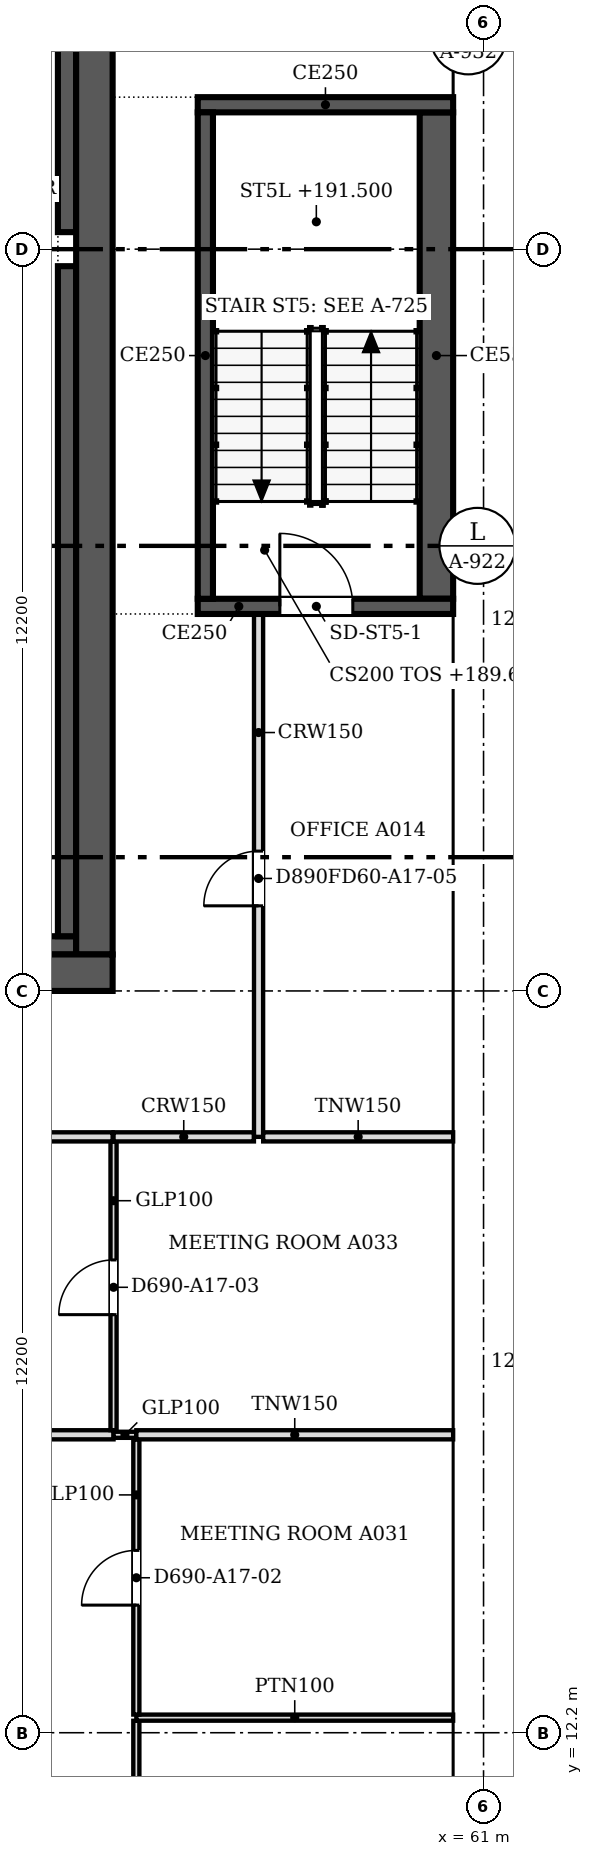
"""IFC4 building model, lengths in metres.
Left out: names, types, materials, properties, quantities, classifications, styles, units other than length and angle.
Written with IfcOpenShell. Run it as: python <this file> out.ifc"""

import sys

from ifc_helpers import new_model, si_unit, direction, frame, frame_2d, origin, place, context, subcontext, project, spatial, polyline, rectangle, outline, extrude, faceted_brep, source, transform, mapped, element, fill, save


model = new_model("IFC4")
c1 = context("Model", 3, precision=1e-05, world=origin(), true_north=direction((0.0, 1.0)))
c2 = subcontext(c1, "Body", "Model", "MODEL_VIEW")
j1 = project(units=[si_unit("LENGTHUNIT", "METRE"), si_unit("PLANEANGLEUNIT", "RADIAN")], contexts=[c1])
p1 = place(None, origin())
s1 = spatial("IfcSite", under=j1, at=p1, CompositionType="ELEMENT")
p2 = place(p1, origin())
s2 = spatial("IfcBuilding", under=s1, at=p2, CompositionType="ELEMENT")
p3 = place(p2, frame((0.0, 0.0, 189.6)))
s3 = spatial("IfcBuildingStorey", under=s2, at=p3, CompositionType="ELEMENT", Elevation=189.6)
m1 = source(origin(), c2, "Body", "SweptSolid", [
    extrude(outline(polyline([(3.05, 0.0), (6.1, 3.8), (3.05, 7.6), (0.0, 3.8), (3.05, 0.0)])), frame((0.0, 0.25, 0.0), z_axis=(0.0, -1.0, 0.0), x_axis=(1.0, 0.0, 0.0)), (0.0, 0.0, 1.0), 0.5),
])
p4 = place(p3, frame((60.75, 9.15, -3.8), z_axis=(0.0, 0.0, 1.0), x_axis=(0.0, 1.0, 0.0)))
e1 = element("IfcWall", 1, at=p4, inside=s3, PredefinedType="SOLIDWALL", context=c2, shape_type="MappedRepresentation", body=[
    mapped(m1, transform((0.0, 0.0, 0.0), scale=1.0)),
])
m2 = source(origin(), c2, "Body", "SweptSolid", [
    extrude(outline(polyline([(3.05, 0.399), (5.78, 3.8), (3.05, 7.2), (0.321, 3.8), (3.05, 0.399)])), frame((0.0, 0.26, 0.0), z_axis=(0.0, -1.0, 0.0), x_axis=(1.0, 0.0, 0.0)), (0.0, 0.0, 1.0), 0.52),
])
p5 = place(p4, origin())
e2 = element("IfcOpeningElement", 2, at=p5, cuts=e1, PredefinedType="OPENING", context=c2, shape_type="MappedRepresentation", body=[
    mapped(m2, transform((0.0, 0.0, 0.0), scale=1.0)),
])
p6 = place(p3, frame((60.75, 15.25, -3.8), z_axis=(0.0, 0.0, 1.0), x_axis=(0.0, 1.0, 0.0)))
e3 = element("IfcWall", 3, at=p6, inside=s3, PredefinedType="SOLIDWALL", context=c2, shape_type="MappedRepresentation", body=[
    mapped(m1, transform((0.0, 0.0, 0.0), scale=1.0)),
])
p7 = place(p6, origin())
e4 = element("IfcOpeningElement", 4, at=p7, cuts=e3, PredefinedType="OPENING", context=c2, shape_type="MappedRepresentation", body=[
    mapped(m2, transform((0.0, 0.0, 0.0), scale=1.0)),
])
m3 = source(origin(), c2, "Body", "Brep", [
    faceted_brep([(3.05, -0.25, 0.0), (6.1, -0.25, 3.8), (6.1, -0.25, 3.8), (3.05, -0.25, 7.6), (0.0, -0.25, 3.8), (0.0, 0.25, 3.8), (3.05, 0.25, 7.6), (6.1, 0.25, 3.8), (6.1, 0.25, 3.8), (3.05, 0.25, 0.0)], [[[0, 1, 2, 3, 4]], [[5, 6, 7, 8, 9]], [[9, 8, 1, 0]], [[7, 6, 3, 2]], [[6, 5, 4, 3]], [[5, 9, 0, 4]], [[1, 8, 7, 2]]]),
])
p8 = place(p3, frame((60.75, 21.35, -3.8), z_axis=(0.0, 0.0, 1.0), x_axis=(0.0, 1.0, 0.0)))
e5 = element("IfcWall", 5, at=p8, inside=s3, PredefinedType="SOLIDWALL", context=c2, shape_type="MappedRepresentation", body=[
    mapped(m3, transform((0.0, 0.0, 0.0), scale=1.0)),
])
p9 = place(p8, origin())
e6 = element("IfcOpeningElement", 6, at=p9, cuts=e5, PredefinedType="OPENING", context=c2, shape_type="MappedRepresentation", body=[
    mapped(m2, transform((0.0, 0.0, 0.0), scale=1.0)),
])
p10 = place(p3, frame((60.75, 27.45, -3.8), z_axis=(0.0, 0.0, 1.0), x_axis=(0.0, 1.0, 0.0)))
e7 = element("IfcWall", 7, at=p10, inside=s3, PredefinedType="SOLIDWALL", context=c2, shape_type="MappedRepresentation", body=[
    mapped(m1, transform((0.0, 0.0, 0.0), scale=1.0)),
])
p11 = place(p10, origin())
e8 = element("IfcOpeningElement", 8, at=p11, cuts=e7, PredefinedType="OPENING", context=c2, shape_type="MappedRepresentation", body=[
    mapped(m2, transform((0.0, 0.0, 0.0), scale=1.0)),
])
p12 = place(p3, frame((60.75, 33.55, -3.8), z_axis=(0.0, 0.0, 1.0), x_axis=(0.0, 1.0, 0.0)))
e9 = element("IfcWall", 9, at=p12, inside=s3, PredefinedType="SOLIDWALL", context=c2, shape_type="MappedRepresentation", body=[
    mapped(m3, transform((0.0, 0.0, 0.0), scale=1.0)),
])
p13 = place(p12, origin())
e10 = element("IfcOpeningElement", 10, at=p13, cuts=e9, PredefinedType="OPENING", context=c2, shape_type="MappedRepresentation", body=[
    mapped(m2, transform((0.0, 0.0, 0.0), scale=1.0)),
])
p14 = place(p3, frame((60.75, 39.65, -3.8), z_axis=(0.0, 0.0, 1.0), x_axis=(0.0, 1.0, 0.0)))
e11 = element("IfcWall", 11, at=p14, inside=s3, PredefinedType="SOLIDWALL", context=c2, shape_type="MappedRepresentation", body=[
    mapped(m1, transform((0.0, 0.0, 0.0), scale=1.0)),
])
p15 = place(p14, origin())
e12 = element("IfcOpeningElement", 12, at=p15, cuts=e11, PredefinedType="OPENING", context=c2, shape_type="MappedRepresentation", body=[
    mapped(m2, transform((0.0, 0.0, 0.0), scale=1.0)),
])
m4 = source(origin(), c2, "Body", "Brep", [
    faceted_brep([(3.003, -0.25, 0.0), (6.053, -0.25, 3.8), (0.0, -0.25, 3.8), (0.047, 0.25, 3.8), (6.053, 0.25, 3.8), (3.003, 0.25, 0.0), (0.047, 0.25, 3.741), (0.0, 0.0, 3.8)], [[[0, 1, 2]], [[3, 4, 5, 6]], [[5, 4, 1, 0]], [[4, 3, 7, 2, 1]], [[6, 5, 0, 2, 7]], [[6, 7, 3]]]),
])
p16 = place(p3, frame((60.75, 6.146, 0.0), z_axis=(0.0, 0.0, 1.0), x_axis=(0.0, 1.0, 0.0)))
e13 = element("IfcWall", 13, at=p16, inside=s3, PredefinedType="SOLIDWALL", context=c2, shape_type="MappedRepresentation", body=[
    mapped(m4, transform((0.0, 0.0, 0.0), scale=1.0)),
])
m5 = source(origin(), c2, "Body", "SweptSolid", [
    extrude(outline(polyline([(3.005, 0.401), (5.532, 3.55), (0.516, 3.55), (3.005, 0.401)])), frame((0.0, 0.26, 0.0), z_axis=(0.0, -1.0, 0.0), x_axis=(1.0, 0.0, 0.0)), (0.0, 0.0, 1.0), 0.52),
])
p17 = place(p16, origin())
e14 = element("IfcOpeningElement", 14, at=p17, cuts=e13, PredefinedType="OPENING", context=c2, shape_type="MappedRepresentation", body=[
    mapped(m5, transform((0.0, 0.0, 0.0), scale=1.0)),
])
m6 = source(origin(), c2, "Body", "SweptSolid", [
    extrude(outline(polyline([(3.05, 0.0), (6.1, 3.8), (0.0, 3.8), (3.05, 0.0)])), frame((0.0, 0.25, 0.0), z_axis=(0.0, -1.0, 0.0), x_axis=(1.0, 0.0, 0.0)), (0.0, 0.0, 1.0), 0.5),
])
p18 = place(p3, frame((60.75, 12.2, 0.0), z_axis=(0.0, 0.0, 1.0), x_axis=(0.0, 1.0, 0.0)))
e15 = element("IfcWall", 15, at=p18, inside=s3, PredefinedType="SOLIDWALL", context=c2, shape_type="MappedRepresentation", body=[
    mapped(m6, transform((0.0, 0.0, 0.0), scale=1.0)),
])
m7 = source(origin(), c2, "Body", "SweptSolid", [
    extrude(outline(polyline([(3.05, 0.399), (5.579, 3.55), (0.521, 3.55), (3.05, 0.399)])), frame((0.0, 0.26, 0.0), z_axis=(0.0, -1.0, 0.0), x_axis=(1.0, 0.0, 0.0)), (0.0, 0.0, 1.0), 0.52),
])
p19 = place(p18, origin())
e16 = element("IfcOpeningElement", 16, at=p19, cuts=e15, PredefinedType="OPENING", context=c2, shape_type="MappedRepresentation", body=[
    mapped(m7, transform((0.0, 0.0, 0.0), scale=1.0)),
])
m8 = source(origin(), c2, "Body", "Brep", [
    faceted_brep([(3.05, -0.25, 0.0), (6.1, -0.25, 3.8), (6.1, -0.25, 3.8), (0.0, -0.25, 3.8), (0.0, 0.25, 3.8), (6.1, 0.25, 3.8), (6.1, 0.25, 3.8), (3.05, 0.25, 0.0)], [[[0, 1, 2, 3]], [[4, 5, 6, 7]], [[7, 6, 1, 0]], [[5, 4, 3, 2]], [[4, 7, 0, 3]], [[1, 6, 5, 2]]]),
])
p20 = place(p3, frame((60.75, 18.3, 0.0), z_axis=(0.0, 0.0, 1.0), x_axis=(0.0, 1.0, 0.0)))
e17 = element("IfcWall", 17, at=p20, inside=s3, PredefinedType="SOLIDWALL", context=c2, shape_type="MappedRepresentation", body=[
    mapped(m8, transform((0.0, 0.0, 0.0), scale=1.0)),
])
p21 = place(p20, origin())
e18 = element("IfcOpeningElement", 18, at=p21, cuts=e17, PredefinedType="OPENING", context=c2, shape_type="MappedRepresentation", body=[
    mapped(m7, transform((0.0, 0.0, 0.0), scale=1.0)),
])
p22 = place(p3, frame((60.75, 24.4, 0.0), z_axis=(0.0, 0.0, 1.0), x_axis=(0.0, 1.0, 0.0)))
e19 = element("IfcWall", 19, at=p22, inside=s3, PredefinedType="SOLIDWALL", context=c2, shape_type="MappedRepresentation", body=[
    mapped(m6, transform((0.0, 0.0, 0.0), scale=1.0)),
])
p23 = place(p22, origin())
e20 = element("IfcOpeningElement", 20, at=p23, cuts=e19, PredefinedType="OPENING", context=c2, shape_type="MappedRepresentation", body=[
    mapped(m7, transform((0.0, 0.0, 0.0), scale=1.0)),
])
p24 = place(p3, frame((60.75, 30.5, 0.0), z_axis=(0.0, 0.0, 1.0), x_axis=(0.0, 1.0, 0.0)))
e21 = element("IfcWall", 21, at=p24, inside=s3, PredefinedType="SOLIDWALL", context=c2, shape_type="MappedRepresentation", body=[
    mapped(m6, transform((0.0, 0.0, 0.0), scale=1.0)),
])
p25 = place(p24, origin())
e22 = element("IfcOpeningElement", 22, at=p25, cuts=e21, PredefinedType="OPENING", context=c2, shape_type="MappedRepresentation", body=[
    mapped(m7, transform((0.0, 0.0, 0.0), scale=1.0)),
])
p26 = place(p3, frame((60.75, 36.6, 0.0), z_axis=(0.0, 0.0, 1.0), x_axis=(0.0, 1.0, 0.0)))
e23 = element("IfcWall", 23, at=p26, inside=s3, PredefinedType="SOLIDWALL", context=c2, shape_type="MappedRepresentation", body=[
    mapped(m8, transform((0.0, 0.0, 0.0), scale=1.0)),
])
p27 = place(p26, origin())
e24 = element("IfcOpeningElement", 24, at=p27, cuts=e23, PredefinedType="OPENING", context=c2, shape_type="MappedRepresentation", body=[
    mapped(m7, transform((0.0, 0.0, 0.0), scale=1.0)),
])
p28 = place(p3, frame((54.9, 24.7, 0.0), z_axis=(0.0, 0.0, 1.0), x_axis=(-1.0, 0.0, 0.0)))
e25 = element("IfcWall", 25, at=p28, inside=s3, PredefinedType="SHEAR", context=c2, shape_type="SweptSolid", body=[
    extrude(rectangle(XDim=24.4, YDim=0.6, at=frame_2d((12.2, 0.0))), origin(), (0.0, 0.0, 1.0), 3.8),
])
m9 = source(origin(), c2, "Body", "SweptSolid", [
    extrude(rectangle(XDim=1.2, YDim=2.1, at=frame_2d((0.6, 1.05))), frame((0.0, 0.31, 0.0), z_axis=(0.0, -1.0, 0.0), x_axis=(1.0, 0.0, 0.0)), (0.0, 0.0, 1.0), 0.62),
])
p29 = place(p28, frame((1.5, 0.0, 0.0)))
e26 = element("IfcOpeningElement", 26, at=p29, cuts=e25, PredefinedType="OPENING", context=c2, shape_type="MappedRepresentation", body=[
    mapped(m9, transform((0.0, 0.0, 0.0), scale=1.0)),
])
p30 = place(p3, frame((54.6, 48.2, 0.0), z_axis=(0.0, 0.0, 1.0), x_axis=(0.0, -1.0, 0.0)))
e27 = element("IfcWall", 27, at=p30, inside=s3, PredefinedType="SHEAR", context=c2, shape_type="SweptSolid", body=[
    extrude(rectangle(XDim=23.2, YDim=0.6, at=frame_2d((11.6, 0.0))), origin(), (0.0, 0.0, 1.0), 3.8),
])
p31 = place(p30, frame((4.9, 0.0, 0.0)))
e28 = element("IfcOpeningElement", 28, at=p31, cuts=e27, PredefinedType="OPENING", context=c2, shape_type="MappedRepresentation", body=[
    mapped(m9, transform((0.0, 0.0, 0.0), scale=1.0)),
])
p32 = place(p3, frame((53.4, 25.15, 0.0), z_axis=(0.0, 0.0, 1.0), x_axis=(1.0, 0.0, 0.0)))
e29 = element("IfcWall", 29, at=p32, inside=s3, PredefinedType="SOLIDWALL", context=c2, shape_type="SweptSolid", body=[
    extrude(rectangle(XDim=0.9, YDim=0.3, at=frame_2d((0.45, 0.0))), origin(), (0.0, 0.0, 1.0), 3.8),
])
p33 = place(p3, frame((54.15, 25.3, 0.0), z_axis=(0.0, 0.0, 1.0), x_axis=(0.0, 1.0, 0.0)))
e30 = element("IfcWall", 30, at=p33, inside=s3, PredefinedType="SOLIDWALL", context=c2, shape_type="SweptSolid", body=[
    extrude(rectangle(XDim=11.02, YDim=0.3, at=frame_2d((5.51, 0.0))), origin(), (0.0, 0.0, 1.0), 3.8),
])
p34 = place(p3, frame((54.15, 36.88, 0.0), z_axis=(0.0, 0.0, 1.0), x_axis=(0.0, 1.0, 0.0)))
e31 = element("IfcWall", 31, at=p34, inside=s3, PredefinedType="SOLIDWALL", context=c2, shape_type="SweptSolid", body=[
    extrude(rectangle(XDim=5.22, YDim=0.3, at=frame_2d((2.61, 0.0))), origin(), (0.0, 0.0, 1.0), 3.8),
])
p35 = place(p3, frame((60.5, 30.725, 0.0), z_axis=(0.0, 0.0, 1.0), x_axis=(-1.0, 0.0, 0.0)))
e32 = element("IfcWall", 32, at=p35, inside=s3, PredefinedType="SOLIDWALL", context=c2, shape_type="SweptSolid", body=[
    extrude(rectangle(XDim=4.2, YDim=0.25, at=frame_2d((2.1, 0.0))), origin(), (0.0, 0.0, 1.0), 3.8),
])
m10 = source(origin(), c2, "Body", "SweptSolid", [
    extrude(rectangle(XDim=1.2, YDim=2.1, at=frame_2d((0.6, 1.05))), frame((0.0, 0.135, 0.0), z_axis=(0.0, -1.0, 0.0), x_axis=(1.0, 0.0, 0.0)), (0.0, 0.0, 1.0), 0.27),
])
p36 = place(p35, frame((1.65, 0.0, 0.0)))
e33 = element("IfcOpeningElement", 33, at=p36, cuts=e32, PredefinedType="OPENING", context=c2, shape_type="MappedRepresentation", body=[
    mapped(m10, transform((0.0, 0.0, 0.0), scale=1.0)),
])
p37 = place(p3, frame((56.425, 30.85, 0.0), z_axis=(0.0, 0.0, 1.0), x_axis=(0.0, 1.0, 0.0)))
e34 = element("IfcWall", 34, at=p37, inside=s3, PredefinedType="SOLIDWALL", context=c2, shape_type="SweptSolid", body=[
    extrude(rectangle(XDim=8.0, YDim=0.25, at=frame_2d((4.0, 0.0))), origin(), (0.0, 0.0, 1.0), 3.8),
])
p38 = place(p3, frame((56.3, 38.975, 0.0), z_axis=(0.0, 0.0, 1.0), x_axis=(1.0, 0.0, 0.0)))
e35 = element("IfcWall", 35, at=p38, inside=s3, PredefinedType="SOLIDWALL", context=c2, shape_type="SweptSolid", body=[
    extrude(rectangle(XDim=4.2, YDim=0.25, at=frame_2d((2.1, 0.0))), origin(), (0.0, 0.0, 1.0), 3.8),
])
p39 = place(p3, frame((60.225, 38.85, 0.0), z_axis=(0.0, 0.0, 1.0), x_axis=(0.0, -1.0, 0.0)))
e36 = element("IfcWall", 36, at=p39, inside=s3, PredefinedType="SOLIDWALL", context=c2, shape_type="SweptSolid", body=[
    extrude(rectangle(XDim=8.0, YDim=0.55, at=frame_2d((4.0, 0.0))), origin(), (0.0, 0.0, 1.0), 3.8),
])
p40 = place(p3, frame((55.29, 12.397, 0.0), z_axis=(0.0, 0.0, 1.0), x_axis=(0.0, -1.0, 0.0)))
e37 = element("IfcWall", 37, at=p40, inside=s3, PredefinedType="PARTITIONING", context=c2, shape_type="SweptSolid", body=[
    extrude(rectangle(XDim=4.297, YDim=0.1, at=frame_2d((2.148, 0.0))), origin(), (0.0, 0.0, 1.0), 2.947),
])
m11 = source(origin(), c2, "Body", "SweptSolid", [
    extrude(rectangle(XDim=0.9, YDim=2.1, at=frame_2d((0.45, 1.05))), frame((0.0, 0.06, 0.0), z_axis=(0.0, -1.0, 0.0), x_axis=(1.0, 0.0, 0.0)), (0.0, 0.0, 1.0), 0.12),
])
p41 = place(p40, frame((1.697, 0.0, 0.0)))
e38 = element("IfcOpeningElement", 38, at=p41, cuts=e37, PredefinedType="OPENING", context=c2, shape_type="MappedRepresentation", body=[
    mapped(m11, transform((0.0, 0.0, 0.0), scale=1.0)),
])
p42 = place(p3, frame((55.29, 12.448, 0.0), z_axis=(0.0, 0.0, 1.0), x_axis=(1.0, 0.0, 0.0)))
e39 = element("IfcWall", 39, at=p42, inside=s3, PredefinedType="PARTITIONING", context=c2, shape_type="SweptSolid", body=[
    extrude(rectangle(XDim=5.21, YDim=0.1, at=frame_2d((2.605, 0.0))), origin(), (0.0, 0.0, 1.0), 2.947),
])
p43 = place(p3, frame((55.29, 17.024, 0.0), z_axis=(0.0, 0.0, 1.0), x_axis=(0.0, -1.0, 0.0)))
e40 = element("IfcWall", 40, at=p43, inside=s3, PredefinedType="PARTITIONING", context=c2, shape_type="SweptSolid", body=[
    extrude(rectangle(XDim=4.525, YDim=0.1, at=frame_2d((2.263, 0.0))), origin(), (0.0, 0.0, 1.0), 2.947),
])
p44 = place(p43, frame((1.825, 0.0, 0.0)))
e41 = element("IfcOpeningElement", 41, at=p44, cuts=e40, PredefinedType="OPENING", context=c2, shape_type="MappedRepresentation", body=[
    mapped(m11, transform((0.0, 0.0, 0.0), scale=1.0)),
])
p45 = place(p3, frame((45.476, 17.1, 0.0), z_axis=(0.0, 0.0, 1.0), x_axis=(1.0, 0.0, 0.0)))
e42 = element("IfcWall", 42, at=p45, inside=s3, PredefinedType="PARTITIONING", context=c2, shape_type="SweptSolid", body=[
    extrude(rectangle(XDim=9.439, YDim=0.15, at=frame_2d((4.719, 0.0))), origin(), (0.0, 0.0, 1.0), 2.947),
])
p46 = place(p3, frame((54.916, 17.1, 0.0), z_axis=(0.0, 0.0, 1.0), x_axis=(1.0, 0.0, 0.0)))
e43 = element("IfcWall", 43, at=p46, inside=s3, PredefinedType="PARTITIONING", context=c2, shape_type="SweptSolid", body=[
    extrude(rectangle(XDim=0.373, YDim=0.1, at=frame_2d((0.187, 0.0))), origin(), (0.0, 0.0, 1.0), 2.947),
])
p47 = place(p3, frame((55.29, 17.1, 0.0), z_axis=(0.0, 0.0, 1.0), x_axis=(1.0, 0.0, 0.0)))
e44 = element("IfcWall", 44, at=p47, inside=s3, PredefinedType="PARTITIONING", context=c2, shape_type="SweptSolid", body=[
    extrude(rectangle(XDim=5.21, YDim=0.15, at=frame_2d((2.605, 0.0))), origin(), (0.0, 0.0, 1.0), 2.947),
])
p48 = place(p3, frame((54.915, 21.924, 0.0), z_axis=(0.0, 0.0, 1.0), x_axis=(0.0, -1.0, 0.0)))
e45 = element("IfcWall", 45, at=p48, inside=s3, PredefinedType="PARTITIONING", context=c2, shape_type="SweptSolid", body=[
    extrude(rectangle(XDim=4.748, YDim=0.1, at=frame_2d((2.374, 0.0))), origin(), (0.0, 0.0, 1.0), 2.947),
])
p49 = place(p48, frame((1.948, 0.0, 0.0)))
e46 = element("IfcOpeningElement", 46, at=p49, cuts=e45, PredefinedType="OPENING", context=c2, shape_type="MappedRepresentation", body=[
    mapped(m11, transform((0.0, 0.0, 0.0), scale=1.0)),
])
p50 = place(p3, frame((45.4, 22.0, 0.0), z_axis=(0.0, 0.0, 1.0), x_axis=(1.0, 0.0, 0.0)))
e47 = element("IfcWall", 47, at=p50, inside=s3, PredefinedType="PARTITIONING", context=c2, shape_type="SweptSolid", body=[
    extrude(rectangle(XDim=9.5, YDim=0.15, at=frame_2d((4.75, 0.0))), origin(), (0.0, 0.0, 1.0), 2.947),
])
p51 = place(p3, frame((54.915, 22.0, 0.0), z_axis=(0.0, 0.0, 1.0), x_axis=(1.0, 0.0, 0.0)))
e48 = element("IfcWall", 48, at=p51, inside=s3, PredefinedType="PARTITIONING", context=c2, shape_type="SweptSolid", body=[
    extrude(rectangle(XDim=2.309, YDim=0.15, at=frame_2d((1.155, 0.0))), origin(), (0.0, 0.0, 1.0), 2.947),
])
p52 = place(p3, frame((57.3, 30.6, 0.0), z_axis=(0.0, 0.0, 1.0), x_axis=(0.0, -1.0, 0.0)))
e49 = element("IfcWall", 49, at=p52, inside=s3, PredefinedType="PARTITIONING", context=c2, shape_type="SweptSolid", body=[
    extrude(rectangle(XDim=8.6, YDim=0.15, at=frame_2d((4.3, 0.0))), origin(), (0.0, 0.0, 1.0), 2.947),
])
m12 = source(origin(), c2, "Body", "SweptSolid", [
    extrude(rectangle(XDim=0.9, YDim=2.1, at=frame_2d((0.45, 1.05))), frame((0.0, 0.085, 0.0), z_axis=(0.0, -1.0, 0.0), x_axis=(1.0, 0.0, 0.0)), (0.0, 0.0, 1.0), 0.17),
])
p53 = place(p52, frame((3.9, 0.0, 0.0)))
e50 = element("IfcOpeningElement", 50, at=p53, cuts=e49, PredefinedType="OPENING", context=c2, shape_type="MappedRepresentation", body=[
    mapped(m12, transform((0.0, 0.0, 0.0), scale=1.0)),
])
p54 = place(p3, frame((57.376, 22.0, 0.0), z_axis=(0.0, 0.0, 1.0), x_axis=(1.0, 0.0, 0.0)))
e51 = element("IfcWall", 51, at=p54, inside=s3, PredefinedType="PARTITIONING", context=c2, shape_type="SweptSolid", body=[
    extrude(rectangle(XDim=3.124, YDim=0.15, at=frame_2d((1.562, 0.0))), origin(), (0.0, 0.0, 1.0), 2.947),
])
m13 = source(origin(), c2, "Body", "SweptSolid", [
    extrude(rectangle(XDim=1.2, YDim=2.1, at=frame_2d((0.6, 1.05))), frame((0.0, 0.025, 0.0), z_axis=(0.0, -1.0, 0.0), x_axis=(1.0, 0.0, 0.0)), (0.0, 0.0, 1.0), 0.05),
])
p55 = place(p36, origin())
e52 = element("IfcDoor", 52, at=p55, inside=s3, OperationType="SINGLE_SWING_RIGHT", PredefinedType="DOOR", context=c2, shape_type="MappedRepresentation", body=[
    mapped(m13, transform((0.0, 0.0, 0.0), scale=1.0)),
])
fill(e33, e52)
m14 = source(origin(), c2, "Body", "SweptSolid", [
    extrude(rectangle(XDim=0.9, YDim=2.1, at=frame_2d((0.45, 1.05))), frame((0.0, 0.025, 0.0), z_axis=(0.0, -1.0, 0.0), x_axis=(1.0, 0.0, 0.0)), (0.0, 0.0, 1.0), 0.05),
])
p56 = place(p44, origin())
e53 = element("IfcDoor", 53, at=p56, inside=s3, OperationType="SINGLE_SWING_RIGHT", PredefinedType="DOOR", context=c2, shape_type="MappedRepresentation", body=[
    mapped(m14, transform((0.0, 0.0, 0.0), scale=1.0)),
])
fill(e41, e53)
p57 = place(p49, origin())
e54 = element("IfcDoor", 54, at=p57, inside=s3, OperationType="SINGLE_SWING_RIGHT", PredefinedType="DOOR", context=c2, shape_type="MappedRepresentation", body=[
    mapped(m14, transform((0.0, 0.0, 0.0), scale=1.0)),
])
fill(e46, e54)
p58 = place(p53, origin())
e55 = element("IfcDoor", 55, at=p58, inside=s3, OperationType="SINGLE_SWING_RIGHT", PredefinedType="DOOR", context=c2, shape_type="MappedRepresentation", body=[
    mapped(m14, transform((0.0, 0.0, 0.0), scale=1.0)),
])
fill(e50, e55)
save(model, sys.argv[1])
